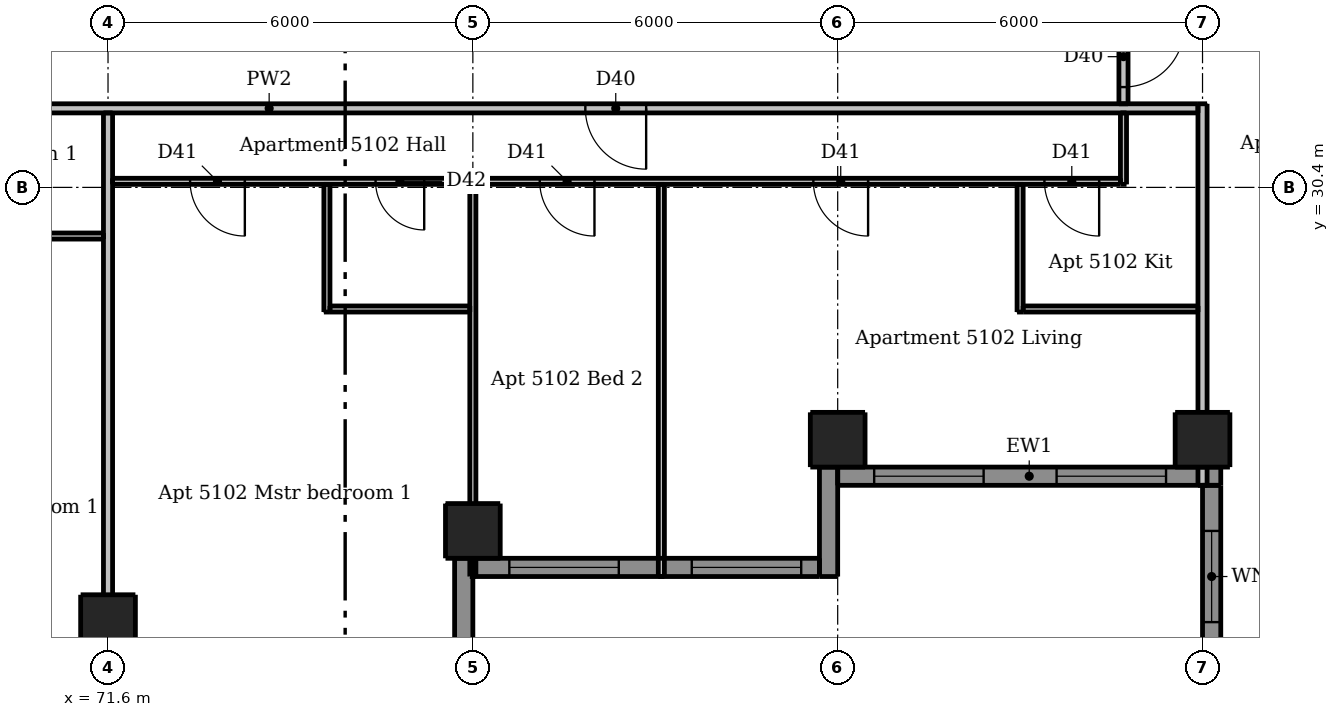
"""IFC4 building model, lengths in metres.
Left out: names, types, materials, properties, quantities, classifications, styles, units other than length and angle.
Written with IfcOpenShell. Run it as: python <this file> out.ifc"""

import sys

from ifc_helpers import new_model, si_unit, direction, frame, frame_2d, origin, origin_2d, place, context, subcontext, project, spatial, rectangle, extrude, element, fill, save


model = new_model("IFC4")
c1 = context("Model", 3, precision=1e-05, world=origin(), true_north=direction((0.0, 1.0)))
c2 = subcontext(c1, "Body", "Model", "MODEL_VIEW")
j1 = project(units=[si_unit("LENGTHUNIT", "METRE"), si_unit("PLANEANGLEUNIT", "RADIAN")], contexts=[c1])
p1 = place(None, origin())
s1 = spatial("IfcSite", under=j1, at=p1, CompositionType="ELEMENT")
p2 = place(p1, origin())
s2 = spatial("IfcBuilding", under=s1, at=p2, CompositionType="ELEMENT")
p3 = place(p2, frame((0.0, 0.0, 193.6)))
s3 = spatial("IfcBuildingStorey", under=s2, at=p3, CompositionType="ELEMENT", Elevation=193.6)
for number, where, z_axis, x_axis in (
    (1, (71.6, 23.25, 0.0), (0.0, 0.0, 1.0), (1.0, 0.0, 0.0)),
    (2, (77.6, 24.75, 0.0), (0.0, 0.0, 1.0), (1.0, 0.0, 0.0)),
    (3, (83.6, 26.25, 0.0), (0.0, 0.0, 1.0), (1.0, 0.0, 0.0)),
    (4, (89.6, 26.25, 0.0), (0.0, 0.0, 1.0), (1.0, 0.0, 0.0)),
):
    element("IfcColumn", number, at=place(p3, frame(where, z_axis=z_axis, x_axis=x_axis)), inside=s3, PredefinedType="COLUMN", context=c2, shape_type="SweptSolid", body=[
        extrude(rectangle(XDim=0.9, YDim=0.9, at=origin_2d()), origin(), (0.0, 0.0, 1.0), 3.05),
    ])
for number, where, z_axis, x_axis in (
    (5, (77.45, 22.5, 0.0), (0.0, 0.0, 1.0), (0.0, 1.0, 0.0)),
    (6, (83.45, 24.0, 0.0), (0.0, 0.0, 1.0), (0.0, 1.0, 0.0)),
):
    element("IfcWall", number, at=place(p3, frame(where, z_axis=z_axis, x_axis=x_axis)), inside=s3, PredefinedType="SOLIDWALL", context=c2, shape_type="SweptSolid", body=[
        extrude(rectangle(XDim=1.8, YDim=0.3, at=frame_2d((0.9, 0.0))), origin(), (0.0, 0.0, 1.0), 3.05),
    ])
p4 = place(p3, frame((89.75, 25.5, 0.0), z_axis=(0.0, 0.0, 1.0), x_axis=(0.0, -1.0, 0.0)))
e7 = element("IfcWall", 7, at=p4, inside=s3, PredefinedType="SOLIDWALL", context=c2, shape_type="SweptSolid", body=[
    extrude(rectangle(XDim=3.0, YDim=0.3, at=frame_2d((1.5, 0.0))), origin(), (0.0, 0.0, 1.0), 3.05),
])
p5 = place(p4, frame((0.75, 0.0, 0.9)))
e8 = element("IfcOpeningElement", 8, at=p5, cuts=e7, PredefinedType="OPENING", context=c2, shape_type="SweptSolid", body=[
    extrude(rectangle(XDim=1.5, YDim=1.5, at=frame_2d((0.75, 0.75))), frame((0.0, 0.16, 0.0), z_axis=(0.0, -1.0, 0.0), x_axis=(1.0, 0.0, 0.0)), (0.0, 0.0, 1.0), 0.32),
])
p6 = place(p3, frame((77.6, 24.15, 0.0), z_axis=(0.0, 0.0, 1.0), x_axis=(1.0, 0.0, 0.0)))
e9 = element("IfcWall", 9, at=p6, inside=s3, PredefinedType="SOLIDWALL", context=c2, shape_type="SweptSolid", body=[
    extrude(rectangle(XDim=5.7, YDim=0.3, at=frame_2d((2.85, 0.0))), origin(), (0.0, 0.0, 1.0), 3.05),
])
p7 = place(p6, frame((0.6, 0.0, 0.15)))
e10 = element("IfcOpeningElement", 10, at=p7, cuts=e9, PredefinedType="OPENING", context=c2, shape_type="SweptSolid", body=[
    extrude(rectangle(XDim=1.8, YDim=2.1, at=frame_2d((0.9, 1.05))), frame((0.0, 0.16, 0.0), z_axis=(0.0, -1.0, 0.0), x_axis=(1.0, 0.0, 0.0)), (0.0, 0.0, 1.0), 0.32),
])
p8 = place(p6, frame((3.6, 0.0, 0.15)))
e11 = element("IfcOpeningElement", 11, at=p8, cuts=e9, PredefinedType="OPENING", context=c2, shape_type="SweptSolid", body=[
    extrude(rectangle(XDim=1.8, YDim=2.1, at=frame_2d((0.9, 1.05))), frame((0.0, 0.16, 0.0), z_axis=(0.0, -1.0, 0.0), x_axis=(1.0, 0.0, 0.0)), (0.0, 0.0, 1.0), 0.32),
])
p9 = place(p3, frame((83.6, 25.65, 0.0), z_axis=(0.0, 0.0, 1.0), x_axis=(1.0, 0.0, 0.0)))
e12 = element("IfcWall", 12, at=p9, inside=s3, PredefinedType="SOLIDWALL", context=c2, shape_type="SweptSolid", body=[
    extrude(rectangle(XDim=6.3, YDim=0.3, at=frame_2d((3.15, 0.0))), origin(), (0.0, 0.0, 1.0), 3.05),
])
p10 = place(p9, frame((0.6, 0.0, 0.15)))
e13 = element("IfcOpeningElement", 13, at=p10, cuts=e12, PredefinedType="OPENING", context=c2, shape_type="SweptSolid", body=[
    extrude(rectangle(XDim=1.8, YDim=2.1, at=frame_2d((0.9, 1.05))), frame((0.0, 0.16, 0.0), z_axis=(0.0, -1.0, 0.0), x_axis=(1.0, 0.0, 0.0)), (0.0, 0.0, 1.0), 0.32),
])
p11 = place(p9, frame((3.6, 0.0, 0.15)))
e14 = element("IfcOpeningElement", 14, at=p11, cuts=e12, PredefinedType="OPENING", context=c2, shape_type="SweptSolid", body=[
    extrude(rectangle(XDim=1.8, YDim=2.1, at=frame_2d((0.9, 1.05))), frame((0.0, 0.16, 0.0), z_axis=(0.0, -1.0, 0.0), x_axis=(1.0, 0.0, 0.0)), (0.0, 0.0, 1.0), 0.32),
])
p12 = place(p3, frame((75.2, 28.35, 0.0), z_axis=(0.0, 0.0, 1.0), x_axis=(0.0, 1.0, 0.0)))
e15 = element("IfcWall", 15, at=p12, inside=s3, PredefinedType="PARTITIONING", context=c2, shape_type="SweptSolid", body=[
    extrude(rectangle(XDim=2.1, YDim=0.1, at=frame_2d((1.05, 0.0))), origin(), (0.0, 0.0, 1.0), 3.05),
])
p13 = place(p3, frame((77.6, 24.0, 0.0), z_axis=(0.0, 0.0, 1.0), x_axis=(0.0, 1.0, 0.0)))
e16 = element("IfcWall", 16, at=p13, inside=s3, PredefinedType="PARTITIONING", context=c2, shape_type="SweptSolid", body=[
    extrude(rectangle(XDim=6.45, YDim=0.1, at=frame_2d((3.225, 0.0))), origin(), (0.0, 0.0, 1.0), 2.59),
])
p14 = place(p3, frame((80.7, 24.0, 0.0), z_axis=(0.0, 0.0, 1.0), x_axis=(0.0, 1.0, 0.0)))
e17 = element("IfcWall", 17, at=p14, inside=s3, PredefinedType="PARTITIONING", context=c2, shape_type="SweptSolid", body=[
    extrude(rectangle(XDim=6.45, YDim=0.1, at=frame_2d((3.225, 0.0))), origin(), (0.0, 0.0, 1.0), 3.05),
])
p15 = place(p3, frame((86.6, 28.35, 0.0), z_axis=(0.0, 0.0, 1.0), x_axis=(0.0, 1.0, 0.0)))
e18 = element("IfcWall", 18, at=p15, inside=s3, PredefinedType="PARTITIONING", context=c2, shape_type="SweptSolid", body=[
    extrude(rectangle(XDim=2.1, YDim=0.1, at=frame_2d((1.05, 0.0))), origin(), (0.0, 0.0, 1.0), 3.05),
])
p16 = place(p3, frame((88.3, 30.45, 0.0), z_axis=(0.0, 0.0, 1.0), x_axis=(0.0, 1.0, 0.0)))
e19 = element("IfcWall", 19, at=p16, inside=s3, PredefinedType="PARTITIONING", context=c2, shape_type="SweptSolid", body=[
    extrude(rectangle(XDim=1.175, YDim=0.1, at=frame_2d((0.587, 0.0))), origin(), (0.0, 0.0, 1.0), 3.05),
])
p17 = place(p3, frame((88.25, 30.5, 0.0), z_axis=(0.0, 0.0, 1.0), x_axis=(-1.0, 0.0, 0.0)))
e20 = element("IfcWall", 20, at=p17, inside=s3, PredefinedType="PARTITIONING", context=c2, shape_type="SweptSolid", body=[
    extrude(rectangle(XDim=16.575, YDim=0.1, at=frame_2d((8.288, 0.0))), origin(), (0.0, 0.0, 1.0), 3.05),
])
p18 = place(p17, frame((4.15, 0.0, 0.0)))
e21 = element("IfcOpeningElement", 21, at=p18, cuts=e20, PredefinedType="OPENING", context=c2, shape_type="SweptSolid", body=[
    extrude(rectangle(XDim=0.9, YDim=2.1, at=frame_2d((0.45, 1.05))), frame((0.0, 0.06, 0.0), z_axis=(0.0, -1.0, 0.0), x_axis=(1.0, 0.0, 0.0)), (0.0, 0.0, 1.0), 0.12),
])
p19 = place(p17, frame((0.35, 0.0, 0.0)))
e22 = element("IfcOpeningElement", 22, at=p19, cuts=e20, PredefinedType="OPENING", context=c2, shape_type="SweptSolid", body=[
    extrude(rectangle(XDim=0.9, YDim=2.1, at=frame_2d((0.45, 1.05))), frame((0.0, 0.06, 0.0), z_axis=(0.0, -1.0, 0.0), x_axis=(1.0, 0.0, 0.0)), (0.0, 0.0, 1.0), 0.12),
])
p20 = place(p17, frame((14.4, 0.0, 0.0)))
e23 = element("IfcOpeningElement", 23, at=p20, cuts=e20, PredefinedType="OPENING", context=c2, shape_type="SweptSolid", body=[
    extrude(rectangle(XDim=0.9, YDim=2.1, at=frame_2d((0.45, 1.05))), frame((0.0, 0.06, 0.0), z_axis=(0.0, -1.0, 0.0), x_axis=(1.0, 0.0, 0.0)), (0.0, 0.0, 1.0), 0.12),
])
p21 = place(p17, frame((8.65, 0.0, 0.0)))
e24 = element("IfcOpeningElement", 24, at=p21, cuts=e20, PredefinedType="OPENING", context=c2, shape_type="SweptSolid", body=[
    extrude(rectangle(XDim=0.9, YDim=2.1, at=frame_2d((0.45, 1.05))), frame((0.0, 0.06, 0.0), z_axis=(0.0, -1.0, 0.0), x_axis=(1.0, 0.0, 0.0)), (0.0, 0.0, 1.0), 0.12),
])
p22 = place(p17, frame((11.45, 0.0, 0.0)))
e25 = element("IfcOpeningElement", 25, at=p22, cuts=e20, PredefinedType="OPENING", context=c2, shape_type="SweptSolid", body=[
    extrude(rectangle(XDim=0.8, YDim=2.1, at=frame_2d((0.4, 1.05))), frame((0.0, 0.06, 0.0), z_axis=(0.0, -1.0, 0.0), x_axis=(1.0, 0.0, 0.0)), (0.0, 0.0, 1.0), 0.12),
])
p23 = place(p3, frame((65.65, 29.6, 0.0), z_axis=(0.0, 0.0, 1.0), x_axis=(1.0, 0.0, 0.0)))
e26 = element("IfcWall", 26, at=p23, inside=s3, PredefinedType="PARTITIONING", context=c2, shape_type="SweptSolid", body=[
    extrude(rectangle(XDim=5.875, YDim=0.1, at=frame_2d((2.938, 0.0))), origin(), (0.0, 0.0, 1.0), 3.05),
])
p24 = place(p23, frame((3.75, 0.0, 0.0)))
e27 = element("IfcOpeningElement", 27, at=p24, cuts=e26, PredefinedType="OPENING", context=c2, shape_type="SweptSolid", body=[
    extrude(rectangle(XDim=0.8, YDim=2.1, at=frame_2d((0.4, 1.05))), frame((0.0, 0.06, 0.0), z_axis=(0.0, -1.0, 0.0), x_axis=(1.0, 0.0, 0.0)), (0.0, 0.0, 1.0), 0.12),
])
p25 = place(p3, frame((75.25, 28.4, 0.0), z_axis=(0.0, 0.0, 1.0), x_axis=(1.0, 0.0, 0.0)))
e28 = element("IfcWall", 28, at=p25, inside=s3, PredefinedType="PARTITIONING", context=c2, shape_type="SweptSolid", body=[
    extrude(rectangle(XDim=2.3, YDim=0.1, at=frame_2d((1.15, 0.0))), origin(), (0.0, 0.0, 1.0), 3.05),
])
p26 = place(p3, frame((86.65, 28.4, 0.0), z_axis=(0.0, 0.0, 1.0), x_axis=(1.0, 0.0, 0.0)))
e29 = element("IfcWall", 29, at=p26, inside=s3, PredefinedType="PARTITIONING", context=c2, shape_type="SweptSolid", body=[
    extrude(rectangle(XDim=2.875, YDim=0.1, at=frame_2d((1.438, 0.0))), origin(), (0.0, 0.0, 1.0), 3.05),
])
p27 = place(p3, frame((71.6, 22.5, 0.0), z_axis=(0.0, 0.0, 1.0), x_axis=(0.0, 1.0, 0.0)))
e30 = element("IfcWall", 30, at=p27, inside=s3, PredefinedType="PARTITIONING", context=c2, shape_type="SweptSolid", body=[
    extrude(rectangle(XDim=9.125, YDim=0.15, at=frame_2d((4.562, 0.0))), origin(), (0.0, 0.0, 1.0), 2.516),
])
p28 = place(p3, frame((88.3, 61.175, 0.0), z_axis=(0.0, 0.0, 1.0), x_axis=(0.0, -1.0, 0.0)))
e31 = element("IfcWall", 31, at=p28, inside=s3, PredefinedType="PARTITIONING", context=c2, shape_type="SweptSolid", body=[
    extrude(rectangle(XDim=29.4, YDim=0.15, at=frame_2d((14.7, 0.0))), origin(), (0.0, 0.0, 1.0), 3.05),
])
p29 = place(p28, frame((28.125, 0.0, 0.0)))
e32 = element("IfcOpeningElement", 32, at=p29, cuts=e31, PredefinedType="OPENING", context=c2, shape_type="SweptSolid", body=[
    extrude(rectangle(XDim=1.0, YDim=2.1, at=frame_2d((0.5, 1.05))), frame((0.0, 0.085, 0.0), z_axis=(0.0, -1.0, 0.0), x_axis=(1.0, 0.0, 0.0)), (0.0, 0.0, 1.0), 0.17),
])
p30 = place(p28, frame((10.725, 0.0, 0.0)))
e33 = element("IfcOpeningElement", 33, at=p30, cuts=e31, PredefinedType="OPENING", context=c2, shape_type="SweptSolid", body=[
    extrude(rectangle(XDim=1.0, YDim=2.1, at=frame_2d((0.5, 1.05))), frame((0.0, 0.085, 0.0), z_axis=(0.0, -1.0, 0.0), x_axis=(1.0, 0.0, 0.0)), (0.0, 0.0, 1.0), 0.17),
])
p31 = place(p3, frame((89.6, 25.5, 0.0), z_axis=(0.0, 0.0, 1.0), x_axis=(0.0, 1.0, 0.0)))
e34 = element("IfcWall", 34, at=p31, inside=s3, PredefinedType="PARTITIONING", context=c2, shape_type="SweptSolid", body=[
    extrude(rectangle(XDim=6.275, YDim=0.15, at=frame_2d((3.137, 0.0))), origin(), (0.0, 0.0, 1.0), 2.516),
])
p32 = place(p3, frame((89.525, 31.7, 0.0), z_axis=(0.0, 0.0, 1.0), x_axis=(-1.0, 0.0, 0.0)))
e35 = element("IfcWall", 35, at=p32, inside=s3, PredefinedType="PARTITIONING", context=c2, shape_type="SweptSolid", body=[
    extrude(rectangle(XDim=30.55, YDim=0.15, at=frame_2d((15.275, 0.0))), origin(), (0.0, 0.0, 1.0), 3.05),
])
p33 = place(p32, frame((26.775, 0.0, 0.0)))
e36 = element("IfcOpeningElement", 36, at=p33, cuts=e35, PredefinedType="OPENING", context=c2, shape_type="SweptSolid", body=[
    extrude(rectangle(XDim=1.0, YDim=2.1, at=frame_2d((0.5, 1.05))), frame((0.0, 0.085, 0.0), z_axis=(0.0, -1.0, 0.0), x_axis=(1.0, 0.0, 0.0)), (0.0, 0.0, 1.0), 0.17),
])
p34 = place(p32, frame((9.075, 0.0, 0.0)))
e37 = element("IfcOpeningElement", 37, at=p34, cuts=e35, PredefinedType="OPENING", context=c2, shape_type="SweptSolid", body=[
    extrude(rectangle(XDim=1.0, YDim=2.1, at=frame_2d((0.5, 1.05))), frame((0.0, 0.085, 0.0), z_axis=(0.0, -1.0, 0.0), x_axis=(1.0, 0.0, 0.0)), (0.0, 0.0, 1.0), 0.17),
])
p35 = place(p5, origin())
e38 = element("IfcWindow", 38, at=p35, inside=s3, PartitioningType="DOUBLE_PANEL_VERTICAL", PredefinedType="WINDOW", context=c2, shape_type="SweptSolid", body=[
    extrude(rectangle(XDim=1.5, YDim=1.5, at=frame_2d((0.75, 0.75))), frame((0.0, 0.03, 0.0), z_axis=(0.0, -1.0, 0.0), x_axis=(1.0, 0.0, 0.0)), (0.0, 0.0, 1.0), 0.06),
])
fill(e8, e38)
p36 = place(p7, origin())
e39 = element("IfcWindow", 39, at=p36, inside=s3, PartitioningType="DOUBLE_PANEL_VERTICAL", PredefinedType="WINDOW", context=c2, shape_type="SweptSolid", body=[
    extrude(rectangle(XDim=1.8, YDim=2.1, at=frame_2d((0.9, 1.05))), frame((0.0, 0.03, 0.0), z_axis=(0.0, -1.0, 0.0), x_axis=(1.0, 0.0, 0.0)), (0.0, 0.0, 1.0), 0.06),
])
fill(e10, e39)
p37 = place(p8, origin())
e40 = element("IfcWindow", 40, at=p37, inside=s3, PartitioningType="DOUBLE_PANEL_VERTICAL", PredefinedType="WINDOW", context=c2, shape_type="SweptSolid", body=[
    extrude(rectangle(XDim=1.8, YDim=2.1, at=frame_2d((0.9, 1.05))), frame((0.0, 0.03, 0.0), z_axis=(0.0, -1.0, 0.0), x_axis=(1.0, 0.0, 0.0)), (0.0, 0.0, 1.0), 0.06),
])
fill(e11, e40)
p38 = place(p10, origin())
e41 = element("IfcWindow", 41, at=p38, inside=s3, PartitioningType="DOUBLE_PANEL_VERTICAL", PredefinedType="WINDOW", context=c2, shape_type="SweptSolid", body=[
    extrude(rectangle(XDim=1.8, YDim=2.1, at=frame_2d((0.9, 1.05))), frame((0.0, 0.03, 0.0), z_axis=(0.0, -1.0, 0.0), x_axis=(1.0, 0.0, 0.0)), (0.0, 0.0, 1.0), 0.06),
])
fill(e13, e41)
p39 = place(p11, origin())
e42 = element("IfcWindow", 42, at=p39, inside=s3, PartitioningType="DOUBLE_PANEL_VERTICAL", PredefinedType="WINDOW", context=c2, shape_type="SweptSolid", body=[
    extrude(rectangle(XDim=1.8, YDim=2.1, at=frame_2d((0.9, 1.05))), frame((0.0, 0.03, 0.0), z_axis=(0.0, -1.0, 0.0), x_axis=(1.0, 0.0, 0.0)), (0.0, 0.0, 1.0), 0.06),
])
fill(e14, e42)
p40 = place(p34, origin())
e43 = element("IfcDoor", 43, at=p40, inside=s3, OperationType="SINGLE_SWING_LEFT", PredefinedType="DOOR", context=c2, shape_type="SweptSolid", body=[
    extrude(rectangle(XDim=1.0, YDim=2.1, at=frame_2d((0.5, 1.05))), frame((0.0, 0.025, 0.0), z_axis=(0.0, -1.0, 0.0), x_axis=(1.0, 0.0, 0.0)), (0.0, 0.0, 1.0), 0.05),
])
fill(e37, e43)
p41 = place(p18, origin())
e44 = element("IfcDoor", 44, at=p41, inside=s3, OperationType="SINGLE_SWING_LEFT", PredefinedType="DOOR", context=c2, shape_type="SweptSolid", body=[
    extrude(rectangle(XDim=0.9, YDim=2.1, at=frame_2d((0.45, 1.05))), frame((0.0, 0.025, 0.0), z_axis=(0.0, -1.0, 0.0), x_axis=(1.0, 0.0, 0.0)), (0.0, 0.0, 1.0), 0.05),
])
fill(e21, e44)
p42 = place(p19, origin())
e45 = element("IfcDoor", 45, at=p42, inside=s3, OperationType="SINGLE_SWING_LEFT", PredefinedType="DOOR", context=c2, shape_type="SweptSolid", body=[
    extrude(rectangle(XDim=0.9, YDim=2.1, at=frame_2d((0.45, 1.05))), frame((0.0, 0.025, 0.0), z_axis=(0.0, -1.0, 0.0), x_axis=(1.0, 0.0, 0.0)), (0.0, 0.0, 1.0), 0.05),
])
fill(e22, e45)
p43 = place(p20, origin())
e46 = element("IfcDoor", 46, at=p43, inside=s3, OperationType="SINGLE_SWING_LEFT", PredefinedType="DOOR", context=c2, shape_type="SweptSolid", body=[
    extrude(rectangle(XDim=0.9, YDim=2.1, at=frame_2d((0.45, 1.05))), frame((0.0, 0.025, 0.0), z_axis=(0.0, -1.0, 0.0), x_axis=(1.0, 0.0, 0.0)), (0.0, 0.0, 1.0), 0.05),
])
fill(e23, e46)
p44 = place(p21, origin())
e47 = element("IfcDoor", 47, at=p44, inside=s3, OperationType="SINGLE_SWING_LEFT", PredefinedType="DOOR", context=c2, shape_type="SweptSolid", body=[
    extrude(rectangle(XDim=0.9, YDim=2.1, at=frame_2d((0.45, 1.05))), frame((0.0, 0.025, 0.0), z_axis=(0.0, -1.0, 0.0), x_axis=(1.0, 0.0, 0.0)), (0.0, 0.0, 1.0), 0.05),
])
fill(e24, e47)
p45 = place(p22, origin())
e48 = element("IfcDoor", 48, at=p45, inside=s3, OperationType="SINGLE_SWING_LEFT", PredefinedType="DOOR", context=c2, shape_type="SweptSolid", body=[
    extrude(rectangle(XDim=0.8, YDim=2.1, at=frame_2d((0.4, 1.05))), frame((0.0, 0.025, 0.0), z_axis=(0.0, -1.0, 0.0), x_axis=(1.0, 0.0, 0.0)), (0.0, 0.0, 1.0), 0.05),
])
fill(e25, e48)
p46 = place(p29, origin())
e49 = element("IfcDoor", 49, at=p46, inside=s3, OperationType="SINGLE_SWING_LEFT", PredefinedType="DOOR", context=c2, shape_type="SweptSolid", body=[
    extrude(rectangle(XDim=1.0, YDim=2.1, at=frame_2d((0.5, 1.05))), frame((0.0, 0.025, 0.0), z_axis=(0.0, -1.0, 0.0), x_axis=(1.0, 0.0, 0.0)), (0.0, 0.0, 1.0), 0.05),
])
fill(e32, e49)
save(model, sys.argv[1])
